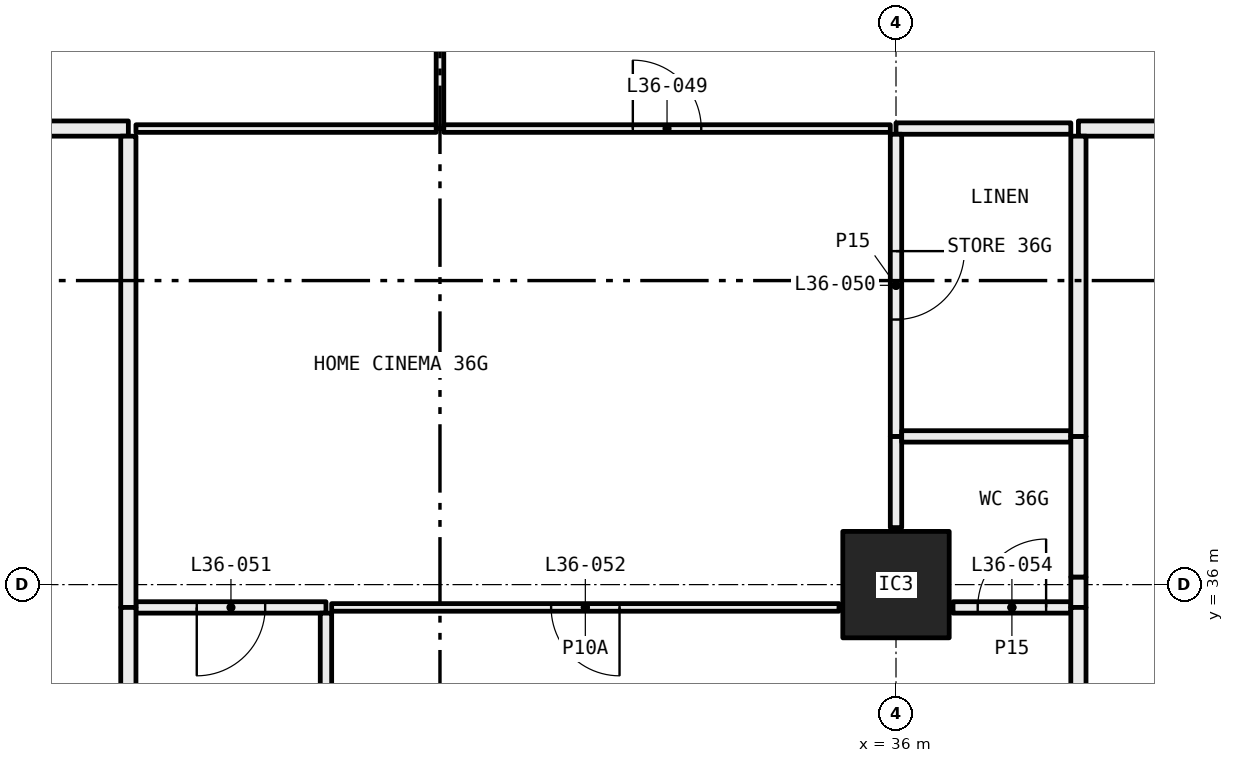
"""IFC4 building model, lengths in metres.
Left out: names, types, materials, properties, quantities, classifications, styles, units other than length and angle.
Written with IfcOpenShell. Run it as: python <this file> out.ifc"""

import sys

from ifc_helpers import new_model, si_unit, direction, frame, frame_2d, origin, origin_2d, place, context, subcontext, project, spatial, rectangle, hollow_rectangle, extrude, element, fill, save


model = new_model("IFC4")
c1 = context("Model", 3, precision=1e-05, world=origin(), true_north=direction((0.0, 1.0)))
c2 = subcontext(c1, "Body", "Model", "MODEL_VIEW")
j1 = project(units=[si_unit("LENGTHUNIT", "METRE"), si_unit("PLANEANGLEUNIT", "RADIAN")], contexts=[c1])
p1 = place(None, origin())
s1 = spatial("IfcSite", under=j1, at=p1, CompositionType="ELEMENT")
p2 = place(p1, origin())
s2 = spatial("IfcBuilding", under=s1, at=p2, CompositionType="ELEMENT")
p3 = place(p2, frame((0.0, 0.0, 138.0)))
s3 = spatial("IfcBuildingStorey", under=s2, at=p3, CompositionType="ELEMENT", Elevation=138.0)
p4 = place(p3, frame((36.0, 36.0, 0.0), z_axis=(0.0, 0.0, 1.0), x_axis=(1.0, 0.0, 0.0)))
e1 = element("IfcColumn", 1, at=p4, inside=s3, PredefinedType="COLUMN", context=c2, shape_type="SweptSolid", body=[
    extrude(hollow_rectangle(XDim=1.4, YDim=1.4, WallThickness=0.06, at=origin_2d()), origin(), (0.0, 0.0, 1.0), 3.05),
])
p5 = place(p3, frame((30.0, 42.0, 0.0), z_axis=(0.0, 0.0, 1.0), x_axis=(0.0, 1.0, 0.0)))
e2 = element("IfcWall", 2, at=p5, inside=s3, PredefinedType="PARTITIONING", context=c2, shape_type="SweptSolid", body=[
    extrude(rectangle(XDim=3.0, YDim=0.1, at=frame_2d((1.5, 0.0))), origin(), (0.0, 0.0, 1.0), 3.05),
])
p6 = place(p5, frame((1.05, 0.0, 0.0)))
e3 = element("IfcOpeningElement", 3, at=p6, cuts=e2, PredefinedType="OPENING", context=c2, shape_type="SweptSolid", body=[
    extrude(rectangle(XDim=0.9, YDim=2.1, at=frame_2d((0.45, 1.05))), frame((0.0, 0.06, 0.0), z_axis=(0.0, -1.0, 0.0), x_axis=(1.0, 0.0, 0.0)), (0.0, 0.0, 1.0), 0.12),
])
p7 = place(p3, frame((26.0, 42.0, 0.0), z_axis=(0.0, 0.0, 1.0), x_axis=(1.0, 0.0, 0.0)))
e4 = element("IfcWall", 4, at=p7, inside=s3, PredefinedType="PARTITIONING", context=c2, shape_type="SweptSolid", body=[
    extrude(rectangle(XDim=3.95, YDim=0.1, at=frame_2d((1.975, 0.0))), origin(), (0.0, 0.0, 1.0), 3.05),
])
p8 = place(p3, frame((24.1, 42.0, 0.0), z_axis=(0.0, 0.0, 1.0), x_axis=(1.0, 0.0, 0.0)))
e5 = element("IfcWall", 5, at=p8, inside=s3, PredefinedType="PARTITIONING", context=c2, shape_type="SweptSolid", body=[
    extrude(rectangle(XDim=1.8, YDim=0.2, at=frame_2d((0.9, 0.0))), origin(), (0.0, 0.0, 1.0), 3.05),
])
p9 = place(p3, frame((30.05, 42.0, 0.0), z_axis=(0.0, 0.0, 1.0), x_axis=(1.0, 0.0, 0.0)))
e6 = element("IfcWall", 6, at=p9, inside=s3, PredefinedType="PARTITIONING", context=c2, shape_type="SweptSolid", body=[
    extrude(rectangle(XDim=5.875, YDim=0.1, at=frame_2d((2.938, 0.0))), origin(), (0.0, 0.0, 1.0), 2.45),
])
p10 = place(p9, frame((2.488, 0.0, 0.0)))
e7 = element("IfcOpeningElement", 7, at=p10, cuts=e6, PredefinedType="OPENING", context=c2, shape_type="SweptSolid", body=[
    extrude(rectangle(XDim=0.9, YDim=2.1, at=frame_2d((0.45, 1.05))), frame((0.0, 0.06, 0.0), z_axis=(0.0, -1.0, 0.0), x_axis=(1.0, 0.0, 0.0)), (0.0, 0.0, 1.0), 0.12),
])
p11 = place(p3, frame((36.0, 42.0, 0.0), z_axis=(0.0, 0.0, 1.0), x_axis=(1.0, 0.0, 0.0)))
e8 = element("IfcWall", 8, at=p11, inside=s3, PredefinedType="PARTITIONING", context=c2, shape_type="SweptSolid", body=[
    extrude(rectangle(XDim=2.3, YDim=0.15, at=frame_2d((1.15, 0.0))), origin(), (0.0, 0.0, 1.0), 2.45),
])
p12 = place(p3, frame((38.4, 42.0, 0.0), z_axis=(0.0, 0.0, 1.0), x_axis=(1.0, 0.0, 0.0)))
e9 = element("IfcWall", 9, at=p12, inside=s3, PredefinedType="PARTITIONING", context=c2, shape_type="SweptSolid", body=[
    extrude(rectangle(XDim=2.4, YDim=0.2, at=frame_2d((1.2, 0.0))), origin(), (0.0, 0.0, 1.0), 3.05),
])
p13 = place(p3, frame((36.0, 36.75, 0.0), z_axis=(0.0, 0.0, 1.0), x_axis=(0.0, 1.0, 0.0)))
e10 = element("IfcWall", 10, at=p13, inside=s3, PredefinedType="PARTITIONING", context=c2, shape_type="SweptSolid", body=[
    extrude(rectangle(XDim=1.2, YDim=0.15, at=frame_2d((0.6, 0.0))), origin(), (0.0, 0.0, 1.0), 2.45),
])
p14 = place(p3, frame((36.0, 37.95, 0.0), z_axis=(0.0, 0.0, 1.0), x_axis=(0.0, 1.0, 0.0)))
e11 = element("IfcWall", 11, at=p14, inside=s3, PredefinedType="PARTITIONING", context=c2, shape_type="SweptSolid", body=[
    extrude(rectangle(XDim=3.975, YDim=0.15, at=frame_2d((1.988, 0.0))), origin(), (0.0, 0.0, 1.0), 2.45),
])
p15 = place(p14, frame((1.538, 0.0, 0.0)))
e12 = element("IfcOpeningElement", 12, at=p15, cuts=e11, PredefinedType="OPENING", context=c2, shape_type="SweptSolid", body=[
    extrude(rectangle(XDim=0.9, YDim=2.1, at=frame_2d((0.45, 1.05))), frame((0.0, 0.085, 0.0), z_axis=(0.0, -1.0, 0.0), x_axis=(1.0, 0.0, 0.0)), (0.0, 0.0, 1.0), 0.17),
])
p16 = place(p3, frame((26.0, 35.7, 0.0), z_axis=(0.0, 0.0, 1.0), x_axis=(1.0, 0.0, 0.0)))
e13 = element("IfcWall", 13, at=p16, inside=s3, PredefinedType="PARTITIONING", context=c2, shape_type="SweptSolid", body=[
    extrude(rectangle(XDim=2.5, YDim=0.15, at=frame_2d((1.25, 0.0))), origin(), (0.0, 0.0, 1.0), 3.05),
])
p17 = place(p16, frame((0.8, 0.0, 0.0)))
e14 = element("IfcOpeningElement", 14, at=p17, cuts=e13, PredefinedType="OPENING", context=c2, shape_type="SweptSolid", body=[
    extrude(rectangle(XDim=0.9, YDim=2.1, at=frame_2d((0.45, 1.05))), frame((0.0, 0.085, 0.0), z_axis=(0.0, -1.0, 0.0), x_axis=(1.0, 0.0, 0.0)), (0.0, 0.0, 1.0), 0.17),
])
p18 = place(p3, frame((28.575, 35.7, 0.0), z_axis=(0.0, 0.0, 1.0), x_axis=(1.0, 0.0, 0.0)))
e15 = element("IfcWall", 15, at=p18, inside=s3, PredefinedType="PARTITIONING", context=c2, shape_type="SweptSolid", body=[
    extrude(rectangle(XDim=6.675, YDim=0.1, at=frame_2d((3.337, 0.0))), origin(), (0.0, 0.0, 1.0), 3.05),
])
p19 = place(p18, frame((2.887, 0.0, 0.0)))
e16 = element("IfcOpeningElement", 16, at=p19, cuts=e15, PredefinedType="OPENING", context=c2, shape_type="SweptSolid", body=[
    extrude(rectangle(XDim=0.9, YDim=2.1, at=frame_2d((0.45, 1.05))), frame((0.0, 0.06, 0.0), z_axis=(0.0, -1.0, 0.0), x_axis=(1.0, 0.0, 0.0)), (0.0, 0.0, 1.0), 0.12),
])
p20 = place(p3, frame((25.9, 41.9, 0.0), z_axis=(0.0, 0.0, 1.0), x_axis=(0.0, -1.0, 0.0)))
e17 = element("IfcWall", 17, at=p20, inside=s3, PredefinedType="PARTITIONING", context=c2, shape_type="SweptSolid", body=[
    extrude(rectangle(XDim=6.2, YDim=0.2, at=frame_2d((3.1, 0.0))), origin(), (0.0, 0.0, 1.0), 2.45),
])
p21 = place(p3, frame((38.3, 37.95, 0.0), z_axis=(0.0, 0.0, 1.0), x_axis=(-1.0, 0.0, 0.0)))
e18 = element("IfcWall", 18, at=p21, inside=s3, PredefinedType="PARTITIONING", context=c2, shape_type="SweptSolid", body=[
    extrude(rectangle(XDim=2.225, YDim=0.15, at=frame_2d((1.113, 0.0))), origin(), (0.0, 0.0, 1.0), 2.45),
])
p22 = place(p3, frame((36.75, 35.7, 0.0), z_axis=(0.0, 0.0, 1.0), x_axis=(1.0, 0.0, 0.0)))
e19 = element("IfcWall", 19, at=p22, inside=s3, PredefinedType="PARTITIONING", context=c2, shape_type="SweptSolid", body=[
    extrude(rectangle(XDim=1.55, YDim=0.15, at=frame_2d((0.775, 0.0))), origin(), (0.0, 0.0, 1.0), 3.05),
])
p23 = place(p22, frame((0.325, 0.0, 0.0)))
e20 = element("IfcOpeningElement", 20, at=p23, cuts=e19, PredefinedType="OPENING", context=c2, shape_type="SweptSolid", body=[
    extrude(rectangle(XDim=0.9, YDim=2.1, at=frame_2d((0.45, 1.05))), frame((0.0, 0.085, 0.0), z_axis=(0.0, -1.0, 0.0), x_axis=(1.0, 0.0, 0.0)), (0.0, 0.0, 1.0), 0.17),
])
p24 = place(p3, frame((38.4, 35.7, 0.0), z_axis=(0.0, 0.0, 1.0), x_axis=(0.0, 1.0, 0.0)))
e21 = element("IfcWall", 21, at=p24, inside=s3, PredefinedType="PARTITIONING", context=c2, shape_type="SweptSolid", body=[
    extrude(rectangle(XDim=0.4, YDim=0.2, at=frame_2d((0.2, 0.0))), origin(), (0.0, 0.0, 1.0), 2.45),
])
p25 = place(p3, frame((38.4, 36.1, 0.0), z_axis=(0.0, 0.0, 1.0), x_axis=(0.0, 1.0, 0.0)))
e22 = element("IfcWall", 22, at=p25, inside=s3, PredefinedType="PARTITIONING", context=c2, shape_type="SweptSolid", body=[
    extrude(rectangle(XDim=1.85, YDim=0.2, at=frame_2d((0.925, 0.0))), origin(), (0.0, 0.0, 1.0), 3.05),
])
p26 = place(p3, frame((38.4, 37.95, 0.0), z_axis=(0.0, 0.0, 1.0), x_axis=(0.0, 1.0, 0.0)))
e23 = element("IfcWall", 23, at=p26, inside=s3, PredefinedType="PARTITIONING", context=c2, shape_type="SweptSolid", body=[
    extrude(rectangle(XDim=3.95, YDim=0.2, at=frame_2d((1.975, 0.0))), origin(), (0.0, 0.0, 1.0), 3.05),
])
p27 = place(p3, frame((28.5, 31.3, 0.0), z_axis=(0.0, 0.0, 1.0), x_axis=(0.0, 1.0, 0.0)))
e24 = element("IfcWall", 24, at=p27, inside=s3, PredefinedType="PARTITIONING", context=c2, shape_type="SweptSolid", body=[
    extrude(rectangle(XDim=4.325, YDim=0.15, at=frame_2d((2.163, 0.0))), origin(), (0.0, 0.0, 1.0), 3.05),
])
p28 = place(p3, frame((25.9, 35.7, 0.0), z_axis=(0.0, 0.0, 1.0), x_axis=(0.0, -1.0, 0.0)))
e25 = element("IfcWall", 25, at=p28, inside=s3, PredefinedType="PARTITIONING", context=c2, shape_type="SweptSolid", body=[
    extrude(rectangle(XDim=4.5, YDim=0.2, at=frame_2d((2.25, 0.0))), origin(), (0.0, 0.0, 1.0), 3.05),
])
p29 = place(p3, frame((38.4, 31.3, 0.0), z_axis=(0.0, 0.0, 1.0), x_axis=(0.0, 1.0, 0.0)))
e26 = element("IfcWall", 26, at=p29, inside=s3, PredefinedType="PARTITIONING", context=c2, shape_type="SweptSolid", body=[
    extrude(rectangle(XDim=4.4, YDim=0.2, at=frame_2d((2.2, 0.0))), origin(), (0.0, 0.0, 1.0), 3.05),
])
p30 = place(p10, origin())
e27 = element("IfcDoor", 27, at=p30, inside=s3, OperationType="SINGLE_SWING_RIGHT", PredefinedType="DOOR", context=c2, shape_type="SweptSolid", body=[
    extrude(rectangle(XDim=0.9, YDim=2.1, at=frame_2d((0.45, 1.05))), frame((0.0, 0.025, 0.0), z_axis=(0.0, -1.0, 0.0), x_axis=(1.0, 0.0, 0.0)), (0.0, 0.0, 1.0), 0.05),
])
fill(e7, e27)
p31 = place(p15, frame((0.9, 0.0, 0.0), x_axis=(-1.0, 0.0, 0.0)))
e28 = element("IfcDoor", 28, at=p31, inside=s3, OperationType="SINGLE_SWING_RIGHT", PredefinedType="DOOR", context=c2, shape_type="SweptSolid", body=[
    extrude(rectangle(XDim=0.9, YDim=2.1, at=frame_2d((0.45, 1.05))), frame((0.0, 0.025, 0.0), z_axis=(0.0, -1.0, 0.0), x_axis=(1.0, 0.0, 0.0)), (0.0, 0.0, 1.0), 0.05),
])
fill(e12, e28)
p32 = place(p17, frame((0.9, 0.0, 0.0), x_axis=(-1.0, 0.0, 0.0)))
e29 = element("IfcDoor", 29, at=p32, inside=s3, OperationType="SINGLE_SWING_LEFT", PredefinedType="DOOR", context=c2, shape_type="SweptSolid", body=[
    extrude(rectangle(XDim=0.9, YDim=2.1, at=frame_2d((0.45, 1.05))), frame((0.0, 0.025, 0.0), z_axis=(0.0, -1.0, 0.0), x_axis=(1.0, 0.0, 0.0)), (0.0, 0.0, 1.0), 0.05),
])
fill(e14, e29)
p33 = place(p19, frame((0.9, 0.0, 0.0), x_axis=(-1.0, 0.0, 0.0)))
e30 = element("IfcDoor", 30, at=p33, inside=s3, OperationType="SINGLE_SWING_RIGHT", PredefinedType="DOOR", context=c2, shape_type="SweptSolid", body=[
    extrude(rectangle(XDim=0.9, YDim=2.1, at=frame_2d((0.45, 1.05))), frame((0.0, 0.025, 0.0), z_axis=(0.0, -1.0, 0.0), x_axis=(1.0, 0.0, 0.0)), (0.0, 0.0, 1.0), 0.05),
])
fill(e16, e30)
p34 = place(p23, origin())
e31 = element("IfcDoor", 31, at=p34, inside=s3, OperationType="SINGLE_SWING_LEFT", PredefinedType="DOOR", context=c2, shape_type="SweptSolid", body=[
    extrude(rectangle(XDim=0.9, YDim=2.1, at=frame_2d((0.45, 1.05))), frame((0.0, 0.025, 0.0), z_axis=(0.0, -1.0, 0.0), x_axis=(1.0, 0.0, 0.0)), (0.0, 0.0, 1.0), 0.05),
])
fill(e20, e31)
save(model, sys.argv[1])
